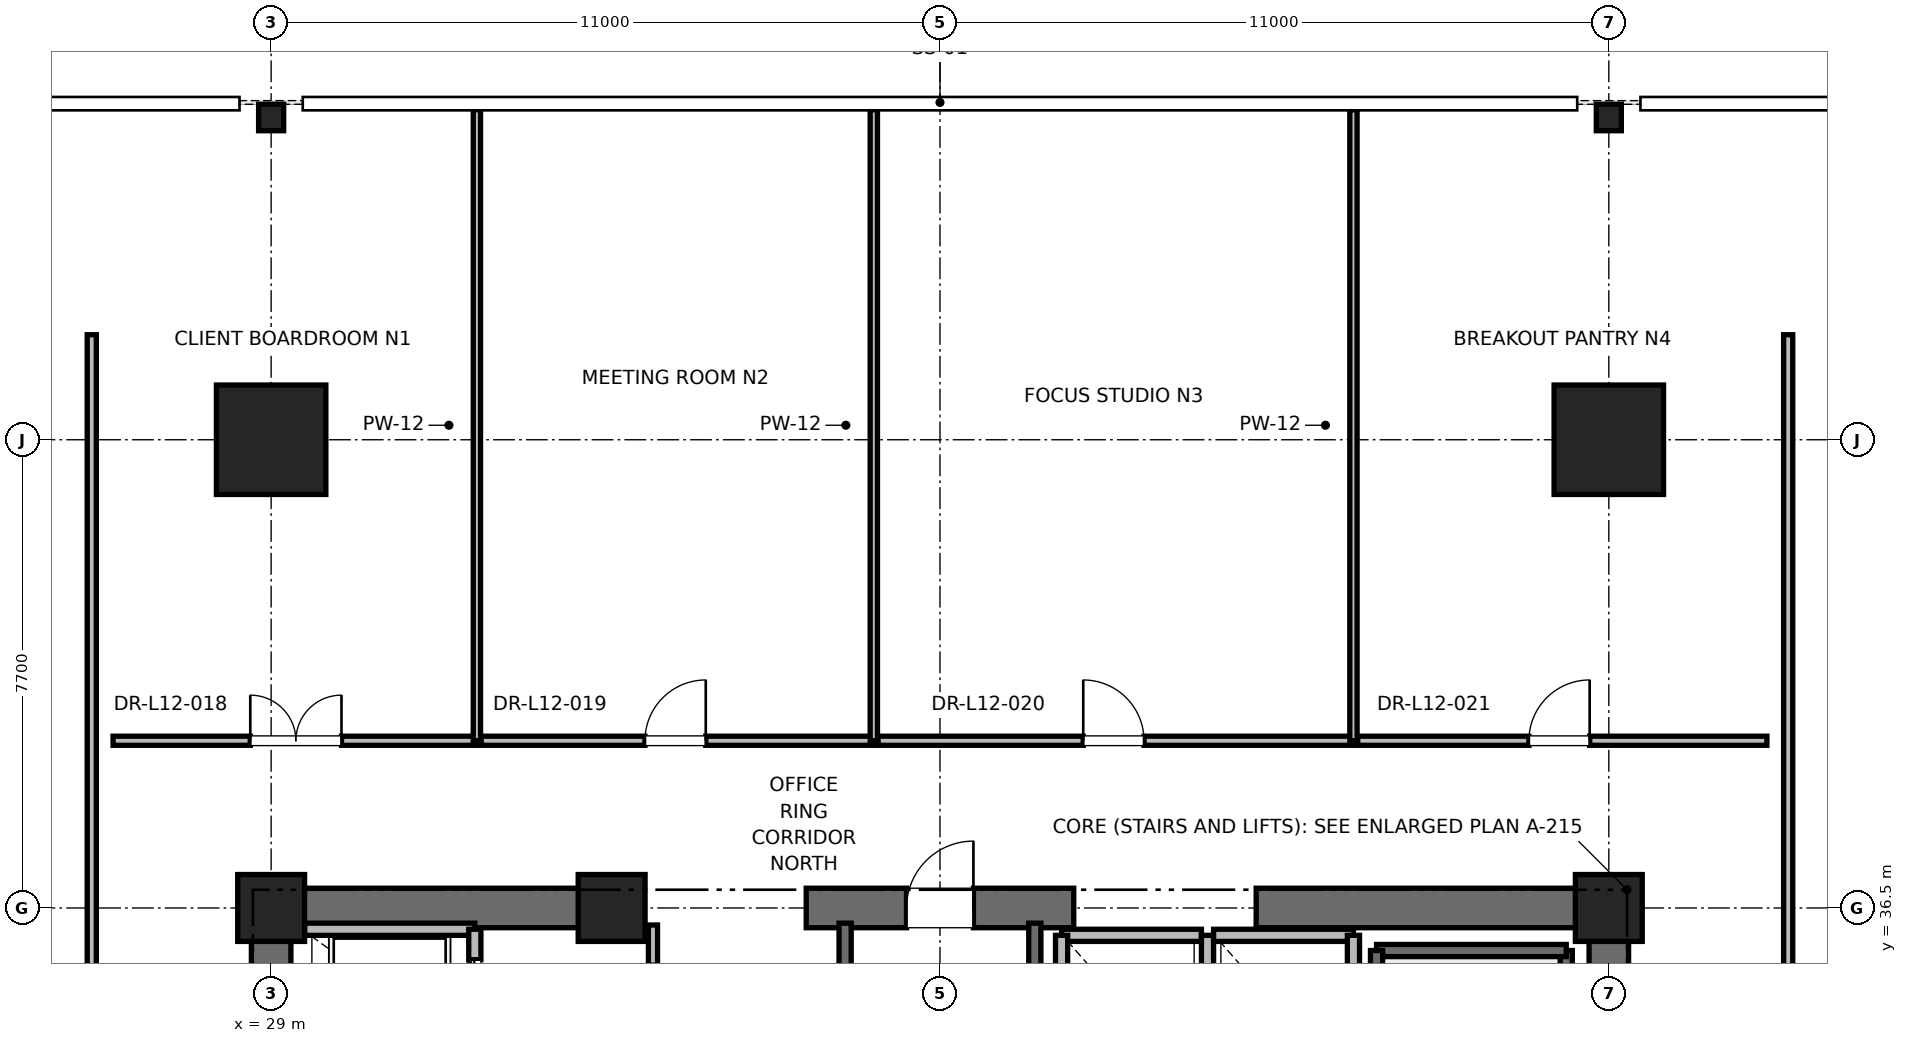
"""IFC4 building model, lengths in metres.
Left out: names, types, materials, properties, quantities, classifications, styles, units other than length and angle.
Written with IfcOpenShell. Run it as: python <this file> out.ifc"""

import sys

from ifc_helpers import new_model, si_unit, direction, frame, frame_2d, origin, origin_2d, place, context, subcontext, project, spatial, rectangle, i_section, extrude, element, fill, save


model = new_model("IFC4")
c1 = context("Model", 3, precision=1e-05, world=origin(), true_north=direction((0.0, 1.0)))
c2 = subcontext(c1, "Body", "Model", "MODEL_VIEW")
j1 = project(units=[si_unit("LENGTHUNIT", "METRE"), si_unit("PLANEANGLEUNIT", "RADIAN")], contexts=[c1])
p1 = place(None, origin())
s1 = spatial("IfcSite", under=j1, at=p1, CompositionType="ELEMENT")
p2 = place(p1, origin())
s2 = spatial("IfcBuilding", under=s1, at=p2, CompositionType="ELEMENT")
p3 = place(p2, frame((0.0, 0.0, 55.6)))
s3 = spatial("IfcBuildingStorey", under=s2, at=p3, CompositionType="ELEMENT", Elevation=55.6)
for number, where, z_axis, x_axis in (
    (1, (29.0, 44.2, 0.0), (0.0, 0.0, 1.0), (1.0, 0.0, 0.0)),
    (2, (51.0, 44.2, 0.0), (0.0, 0.0, 1.0), (1.0, 0.0, 0.0)),
):
    element("IfcColumn", number, at=place(p3, frame(where, z_axis=z_axis, x_axis=x_axis)), inside=s3, PredefinedType="COLUMN", context=c2, shape_type="SweptSolid", body=[
        extrude(rectangle(XDim=1.8, YDim=1.8, at=origin_2d()), origin(), (0.0, 0.0, 1.0), 4.0),
    ])
for number, where, z_axis, x_axis in (
    (3, (29.0, 49.5, 0.0), (0.0, 0.0, 1.0), (1.0, 0.0, 0.0)),
    (4, (51.0, 49.5, 0.0), (0.0, 0.0, 1.0), (1.0, 0.0, 0.0)),
):
    element("IfcColumn", number, at=place(p3, frame(where, z_axis=z_axis, x_axis=x_axis)), inside=s3, PredefinedType="COLUMN", context=c2, shape_type="SweptSolid", body=[
        extrude(i_section(OverallWidth=0.412, OverallDepth=0.437, WebThickness=0.036, FlangeThickness=0.058, FilletRadius=0.015, at=origin_2d()), origin(), (0.0, 0.0, 1.0), 4.0),
    ])
for number, where, z_axis, x_axis in (
    (5, (29.0, 36.5, 0.0), (0.0, 0.0, 1.0), (1.0, 0.0, 0.0)),
    (6, (51.0, 36.5, 0.0), (0.0, 0.0, 1.0), (1.0, 0.0, 0.0)),
    (7, (34.6, 36.5, 0.0), (0.0, 0.0, 1.0), (1.0, 0.0, 0.0)),
):
    element("IfcColumn", number, at=place(p3, frame(where, z_axis=z_axis, x_axis=x_axis)), inside=s3, PredefinedType="PILASTER", context=c2, shape_type="SweptSolid", body=[
        extrude(rectangle(XDim=1.1, YDim=1.1, at=origin_2d()), origin(), (0.0, 0.0, 1.0), 4.0),
    ])
p4 = place(p3, frame((29.0, 36.5, 0.0), z_axis=(0.0, 0.0, 1.0), x_axis=(1.0, 0.0, 0.0)))
e8 = element("IfcWall", 8, at=p4, inside=s3, PredefinedType="SHEAR", context=c2, shape_type="SweptSolid", body=[
    extrude(rectangle(XDim=5.8, YDim=0.65, at=frame_2d((2.9, 0.0))), origin(), (0.0, 0.0, 1.0), 3.76),
])
p5 = place(p3, frame((37.8, 36.5, 0.0), z_axis=(0.0, 0.0, 1.0), x_axis=(1.0, 0.0, 0.0)))
e9 = element("IfcWall", 9, at=p5, inside=s3, PredefinedType="SHEAR", context=c2, shape_type="SweptSolid", body=[
    extrude(rectangle(XDim=4.4, YDim=0.65, at=frame_2d((2.2, 0.0))), origin(), (0.0, 0.0, 1.0), 3.76),
])
p6 = place(p5, frame((1.65, 0.0, 0.0)))
e10 = element("IfcOpeningElement", 10, at=p6, cuts=e9, PredefinedType="OPENING", context=c2, shape_type="SweptSolid", body=[
    extrude(rectangle(XDim=1.1, YDim=2.15, at=frame_2d((0.55, 1.075))), frame((0.0, 0.325, 0.0), z_axis=(0.0, -1.0, 0.0), x_axis=(1.0, 0.0, 0.0)), (0.0, 0.0, 1.0), 0.65),
])
for number, where, z_axis, x_axis in (
    (11, (45.2, 36.5, 0.0), (0.0, 0.0, 1.0), (1.0, 0.0, 0.0)),
    (12, (29.0, 30.7, 0.0), (0.0, 0.0, 1.0), (0.0, 1.0, 0.0)),
):
    element("IfcWall", number, at=place(p3, frame(where, z_axis=z_axis, x_axis=x_axis)), inside=s3, PredefinedType="SHEAR", context=c2, shape_type="SweptSolid", body=[
        extrude(rectangle(XDim=5.8, YDim=0.65, at=frame_2d((2.9, 0.0))), origin(), (0.0, 0.0, 1.0), 3.76),
    ])
p7 = place(p3, frame((51.0, 27.7, 0.0), z_axis=(0.0, 0.0, 1.0), x_axis=(0.0, 1.0, 0.0)))
e13 = element("IfcWall", 13, at=p7, inside=s3, PredefinedType="SHEAR", context=c2, shape_type="SweptSolid", body=[
    extrude(rectangle(XDim=8.8, YDim=0.65, at=frame_2d((4.4, 0.0))), origin(), (0.0, 0.0, 1.0), 3.76),
])
p8 = place(p3, frame((50.3, 27.65, 0.0), z_axis=(0.0, 0.0, 1.0), x_axis=(0.0, 1.0, 0.0)))
e14 = element("IfcWall", 14, at=p8, inside=s3, PredefinedType="SOLIDWALL", context=c2, shape_type="SweptSolid", body=[
    extrude(rectangle(XDim=8.15, YDim=0.2, at=frame_2d((4.075, 0.0))), origin(), (0.0, 0.0, 1.0), 3.76),
])
p9 = place(p3, frame((47.18, 35.8, 0.0), z_axis=(0.0, 0.0, 1.0), x_axis=(1.0, 0.0, 0.0)))
e15 = element("IfcWall", 15, at=p9, inside=s3, PredefinedType="SOLIDWALL", context=c2, shape_type="SweptSolid", body=[
    extrude(rectangle(XDim=3.12, YDim=0.2, at=frame_2d((1.56, 0.0))), origin(), (0.0, 0.0, 1.0), 3.76),
])
p10 = place(p3, frame((47.18, 27.62, 0.0), z_axis=(0.0, 0.0, 1.0), x_axis=(0.0, 1.0, 0.0)))
e16 = element("IfcWall", 16, at=p10, inside=s3, PredefinedType="SOLIDWALL", context=c2, shape_type="SweptSolid", body=[
    extrude(rectangle(XDim=8.18, YDim=0.2, at=frame_2d((4.09, 0.0))), origin(), (0.0, 0.0, 1.0), 3.76),
])
p11 = place(p3, frame((38.44, 27.38, 0.0), z_axis=(0.0, 0.0, 1.0), x_axis=(0.0, 1.0, 0.0)))
e17 = element("IfcWall", 17, at=p11, inside=s3, PredefinedType="SOLIDWALL", context=c2, shape_type="SweptSolid", body=[
    extrude(rectangle(XDim=8.87, YDim=0.2, at=frame_2d((4.435, 0.0))), origin(), (0.0, 0.0, 1.0), 3.76),
])
p12 = place(p3, frame((41.56, 27.68, 0.0), z_axis=(0.0, 0.0, 1.0), x_axis=(0.0, 1.0, 0.0)))
e18 = element("IfcWall", 18, at=p12, inside=s3, PredefinedType="SOLIDWALL", context=c2, shape_type="SweptSolid", body=[
    extrude(rectangle(XDim=8.57, YDim=0.2, at=frame_2d((4.285, 0.0))), origin(), (0.0, 0.0, 1.0), 3.76),
])
p13 = place(p3, frame((32.35, 36.15, 0.0), z_axis=(0.0, 0.0, 1.0), x_axis=(-1.0, 0.0, 0.0)))
e19 = element("IfcWall", 19, at=p13, inside=s3, PredefinedType="SOLIDWALL", context=c2, shape_type="SweptSolid", body=[
    extrude(rectangle(XDim=2.8, YDim=0.2, at=frame_2d((1.4, 0.0))), origin(), (0.0, 0.0, 1.0), 2.889),
])
p14 = place(p3, frame((32.35, 34.05, 0.0), z_axis=(0.0, 0.0, 1.0), x_axis=(0.0, 1.0, 0.0)))
e20 = element("IfcWall", 20, at=p14, inside=s3, PredefinedType="SOLIDWALL", context=c2, shape_type="SweptSolid", body=[
    extrude(rectangle(XDim=2.1, YDim=0.2, at=frame_2d((1.05, 0.0))), origin(), (0.0, 0.0, 1.0), 3.76),
])
p15 = place(p14, frame((0.5, 0.0, 0.0)))
e21 = element("IfcOpeningElement", 21, at=p15, cuts=e20, PredefinedType="OPENING", context=c2, shape_type="SweptSolid", body=[
    extrude(rectangle(XDim=1.1, YDim=2.2, at=frame_2d((0.55, 1.1))), frame((0.0, 0.1, 0.0), z_axis=(0.0, -1.0, 0.0), x_axis=(1.0, 0.0, 0.0)), (0.0, 0.0, 1.0), 0.2),
])
p16 = place(p3, frame((44.3, 36.05, 0.0), z_axis=(0.0, 0.0, 1.0), x_axis=(-1.0, 0.0, 0.0)))
e22 = element("IfcWall", 22, at=p16, inside=s3, PredefinedType="SOLIDWALL", context=c2, shape_type="SweptSolid", body=[
    extrude(rectangle(XDim=2.3, YDim=0.2, at=frame_2d((1.15, 0.0))), origin(), (0.0, 0.0, 1.0), 2.54),
])
for number, where, z_axis, x_axis in (
    (23, (42.0, 36.05, 0.0), (0.0, 0.0, 1.0), (0.0, -1.0, 0.0)),
    (24, (44.4, 33.45, 0.0), (0.0, 0.0, 1.0), (0.0, 1.0, 0.0)),
):
    element("IfcWall", number, at=place(p3, frame(where, z_axis=z_axis, x_axis=x_axis)), inside=s3, PredefinedType="SOLIDWALL", context=c2, shape_type="SweptSolid", body=[
        extrude(rectangle(XDim=2.6, YDim=0.2, at=frame_2d((1.3, 0.0))), origin(), (0.0, 0.0, 1.0), 2.54),
    ])
p17 = place(p3, frame((46.8, 36.05, 0.0), z_axis=(0.0, 0.0, 1.0), x_axis=(-1.0, 0.0, 0.0)))
e25 = element("IfcWall", 25, at=p17, inside=s3, PredefinedType="SOLIDWALL", context=c2, shape_type="SweptSolid", body=[
    extrude(rectangle(XDim=2.3, YDim=0.2, at=frame_2d((1.15, 0.0))), origin(), (0.0, 0.0, 1.0), 2.54),
])
p18 = place(p3, frame((46.8, 33.45, 0.0), z_axis=(0.0, 0.0, 1.0), x_axis=(0.0, 1.0, 0.0)))
e26 = element("IfcWall", 26, at=p18, inside=s3, PredefinedType="SOLIDWALL", context=c2, shape_type="SweptSolid", body=[
    extrude(rectangle(XDim=2.6, YDim=0.2, at=frame_2d((1.3, 0.0))), origin(), (0.0, 0.0, 1.0), 3.76),
])
p19 = place(p3, frame((35.28, 33.95, 0.0), z_axis=(0.0, 0.0, 1.0), x_axis=(0.0, 1.0, 0.0)))
e27 = element("IfcWall", 27, at=p19, inside=s3, PredefinedType="PARTITIONING", context=c2, shape_type="SweptSolid", body=[
    extrude(rectangle(XDim=2.27, YDim=0.15, at=frame_2d((1.135, 0.0))), origin(), (0.0, 0.0, 1.0), 2.54),
])
p20 = place(p19, frame((0.66, 0.0, 0.0)))
e28 = element("IfcOpeningElement", 28, at=p20, cuts=e27, PredefinedType="OPENING", context=c2, shape_type="SweptSolid", body=[
    extrude(rectangle(XDim=0.95, YDim=2.15, at=frame_2d((0.475, 1.075))), frame((0.0, 0.075, 0.0), z_axis=(0.0, -1.0, 0.0), x_axis=(1.0, 0.0, 0.0)), (0.0, 0.0, 1.0), 0.15),
])
p21 = place(p3, frame((26.4, 39.25, 0.0), z_axis=(0.0, 0.0, 1.0), x_axis=(1.0, 0.0, 0.0)))
e29 = element("IfcWall", 29, at=p21, inside=s3, PredefinedType="PARTITIONING", context=c2, shape_type="SweptSolid", body=[
    extrude(rectangle(XDim=5.984, YDim=0.15, at=frame_2d((2.992, 0.0))), origin(), (0.0, 0.0, 1.0), 2.85),
])
p22 = place(p21, frame((2.257, 0.0, 0.0)))
e30 = element("IfcOpeningElement", 30, at=p22, cuts=e29, PredefinedType="OPENING", context=c2, shape_type="SweptSolid", body=[
    extrude(rectangle(XDim=1.5, YDim=2.25, at=frame_2d((0.75, 1.125))), frame((0.0, 0.075, 0.0), z_axis=(0.0, -1.0, 0.0), x_axis=(1.0, 0.0, 0.0)), (0.0, 0.0, 1.0), 0.15),
])
p23 = place(p3, frame((32.384, 39.25, 0.0), z_axis=(0.0, 0.0, 1.0), x_axis=(0.0, 1.0, 0.0)))
e31 = element("IfcWall", 31, at=p23, inside=s3, PredefinedType="PARTITIONING", context=c2, shape_type="SweptSolid", body=[
    extrude(rectangle(XDim=10.377, YDim=0.12, at=frame_2d((5.188, 0.0))), origin(), (0.0, 0.0, 1.0), 2.39),
])
p24 = place(p3, frame((32.454, 39.25, 0.0), z_axis=(0.0, 0.0, 1.0), x_axis=(1.0, 0.0, 0.0)))
e32 = element("IfcWall", 32, at=p24, inside=s3, PredefinedType="PARTITIONING", context=c2, shape_type="SweptSolid", body=[
    extrude(rectangle(XDim=6.458, YDim=0.15, at=frame_2d((3.229, 0.0))), origin(), (0.0, 0.0, 1.0), 2.85),
])
p25 = place(p24, frame((2.694, 0.0, 0.0)))
e33 = element("IfcOpeningElement", 33, at=p25, cuts=e32, PredefinedType="OPENING", context=c2, shape_type="SweptSolid", body=[
    extrude(rectangle(XDim=1.0, YDim=2.15, at=frame_2d((0.5, 1.075))), frame((0.0, 0.075, 0.0), z_axis=(0.0, -1.0, 0.0), x_axis=(1.0, 0.0, 0.0)), (0.0, 0.0, 1.0), 0.15),
])
p26 = place(p3, frame((38.912, 39.25, 0.0), z_axis=(0.0, 0.0, 1.0), x_axis=(0.0, 1.0, 0.0)))
e34 = element("IfcWall", 34, at=p26, inside=s3, PredefinedType="PARTITIONING", context=c2, shape_type="SweptSolid", body=[
    extrude(rectangle(XDim=10.377, YDim=0.12, at=frame_2d((5.188, 0.0))), origin(), (0.0, 0.0, 1.0), 2.39),
])
p27 = place(p3, frame((38.982, 39.25, 0.0), z_axis=(0.0, 0.0, 1.0), x_axis=(1.0, 0.0, 0.0)))
e35 = element("IfcWall", 35, at=p27, inside=s3, PredefinedType="PARTITIONING", context=c2, shape_type="SweptSolid", body=[
    extrude(rectangle(XDim=7.818, YDim=0.15, at=frame_2d((3.909, 0.0))), origin(), (0.0, 0.0, 1.0), 2.85),
])
p28 = place(p27, frame((3.374, 0.0, 0.0)))
e36 = element("IfcOpeningElement", 36, at=p28, cuts=e35, PredefinedType="OPENING", context=c2, shape_type="SweptSolid", body=[
    extrude(rectangle(XDim=1.0, YDim=2.15, at=frame_2d((0.5, 1.075))), frame((0.0, 0.075, 0.0), z_axis=(0.0, -1.0, 0.0), x_axis=(1.0, 0.0, 0.0)), (0.0, 0.0, 1.0), 0.15),
])
p29 = place(p3, frame((46.8, 39.25, 0.0), z_axis=(0.0, 0.0, 1.0), x_axis=(0.0, 1.0, 0.0)))
e37 = element("IfcWall", 37, at=p29, inside=s3, PredefinedType="PARTITIONING", context=c2, shape_type="SweptSolid", body=[
    extrude(rectangle(XDim=10.377, YDim=0.12, at=frame_2d((5.188, 0.0))), origin(), (0.0, 0.0, 1.0), 2.39),
])
p30 = place(p3, frame((46.87, 39.25, 0.0), z_axis=(0.0, 0.0, 1.0), x_axis=(1.0, 0.0, 0.0)))
e38 = element("IfcWall", 38, at=p30, inside=s3, PredefinedType="PARTITIONING", context=c2, shape_type="SweptSolid", body=[
    extrude(rectangle(XDim=6.73, YDim=0.15, at=frame_2d((3.365, 0.0))), origin(), (0.0, 0.0, 1.0), 2.85),
])
p31 = place(p30, frame((2.815, 0.0, 0.0)))
e39 = element("IfcOpeningElement", 39, at=p31, cuts=e38, PredefinedType="OPENING", context=c2, shape_type="SweptSolid", body=[
    extrude(rectangle(XDim=1.0, YDim=2.15, at=frame_2d((0.5, 1.075))), frame((0.0, 0.075, 0.0), z_axis=(0.0, -1.0, 0.0), x_axis=(1.0, 0.0, 0.0)), (0.0, 0.0, 1.0), 0.15),
])
p32 = place(p3, frame((26.05, 30.518, 0.0), z_axis=(0.0, 0.0, 1.0), x_axis=(0.0, 1.0, 0.0)))
e40 = element("IfcWall", 40, at=p32, inside=s3, PredefinedType="PARTITIONING", context=c2, shape_type="SweptSolid", body=[
    extrude(rectangle(XDim=15.409, YDim=0.15, at=frame_2d((7.705, 0.0))), origin(), (0.0, 0.0, 1.0), 2.85),
])
p33 = place(p32, frame((2.416, 0.0, 0.0)))
e41 = element("IfcOpeningElement", 41, at=p33, cuts=e40, PredefinedType="OPENING", context=c2, shape_type="SweptSolid", body=[
    extrude(rectangle(XDim=1.05, YDim=2.2, at=frame_2d((0.525, 1.1))), frame((0.0, 0.075, 0.0), z_axis=(0.0, -1.0, 0.0), x_axis=(1.0, 0.0, 0.0)), (0.0, 0.0, 1.0), 0.15),
])
p34 = place(p3, frame((53.95, 31.992, 0.0), z_axis=(0.0, 0.0, 1.0), x_axis=(0.0, 1.0, 0.0)))
e42 = element("IfcWall", 42, at=p34, inside=s3, PredefinedType="PARTITIONING", context=c2, shape_type="SweptSolid", body=[
    extrude(rectangle(XDim=13.935, YDim=0.15, at=frame_2d((6.967, 0.0))), origin(), (0.0, 0.0, 1.0), 2.85),
])
p35 = place(p34, frame((1.704, 0.0, 0.0)))
e43 = element("IfcOpeningElement", 43, at=p35, cuts=e42, PredefinedType="OPENING", context=c2, shape_type="SweptSolid", body=[
    extrude(rectangle(XDim=1.0, YDim=2.15, at=frame_2d((0.5, 1.075))), frame((0.0, 0.075, 0.0), z_axis=(0.0, -1.0, 0.0), x_axis=(1.0, 0.0, 0.0)), (0.0, 0.0, 1.0), 0.15),
])
p36 = place(p6, origin())
e44 = element("IfcDoor", 44, at=p36, inside=s3, OperationType="SINGLE_SWING_RIGHT", PredefinedType="DOOR", context=c2, shape_type="SweptSolid", body=[
    extrude(rectangle(XDim=1.1, YDim=2.15, at=frame_2d((0.55, 1.075))), frame((0.0, 0.025, 0.0), z_axis=(0.0, -1.0, 0.0), x_axis=(1.0, 0.0, 0.0)), (0.0, 0.0, 1.0), 0.05),
])
fill(e10, e44)
p37 = place(p15, origin())
e45 = element("IfcDoor", 45, at=p37, inside=s3, OperationType="SLIDING_TO_RIGHT", PredefinedType="DOOR", context=c2, shape_type="SweptSolid", body=[
    extrude(rectangle(XDim=1.1, YDim=2.2, at=frame_2d((0.55, 1.1))), frame((0.0, 0.025, 0.0), z_axis=(0.0, -1.0, 0.0), x_axis=(1.0, 0.0, 0.0)), (0.0, 0.0, 1.0), 0.05),
])
fill(e21, e45)
p38 = place(p22, origin())
e46 = element("IfcDoor", 46, at=p38, inside=s3, OperationType="DOUBLE_DOOR_SINGLE_SWING", PredefinedType="DOOR", context=c2, shape_type="SweptSolid", body=[
    extrude(rectangle(XDim=1.5, YDim=2.25, at=frame_2d((0.75, 1.125))), frame((0.0, 0.025, 0.0), z_axis=(0.0, -1.0, 0.0), x_axis=(1.0, 0.0, 0.0)), (0.0, 0.0, 1.0), 0.05),
])
fill(e30, e46)
p39 = place(p25, origin())
e47 = element("IfcDoor", 47, at=p39, inside=s3, OperationType="SINGLE_SWING_RIGHT", PredefinedType="DOOR", context=c2, shape_type="SweptSolid", body=[
    extrude(rectangle(XDim=1.0, YDim=2.15, at=frame_2d((0.5, 1.075))), frame((0.0, 0.025, 0.0), z_axis=(0.0, -1.0, 0.0), x_axis=(1.0, 0.0, 0.0)), (0.0, 0.0, 1.0), 0.05),
])
fill(e33, e47)
p40 = place(p28, origin())
e48 = element("IfcDoor", 48, at=p40, inside=s3, OperationType="SINGLE_SWING_LEFT", PredefinedType="DOOR", context=c2, shape_type="SweptSolid", body=[
    extrude(rectangle(XDim=1.0, YDim=2.15, at=frame_2d((0.5, 1.075))), frame((0.0, 0.025, 0.0), z_axis=(0.0, -1.0, 0.0), x_axis=(1.0, 0.0, 0.0)), (0.0, 0.0, 1.0), 0.05),
])
fill(e36, e48)
p41 = place(p31, origin())
e49 = element("IfcDoor", 49, at=p41, inside=s3, OperationType="SINGLE_SWING_RIGHT", PredefinedType="DOOR", context=c2, shape_type="SweptSolid", body=[
    extrude(rectangle(XDim=1.0, YDim=2.15, at=frame_2d((0.5, 1.075))), frame((0.0, 0.025, 0.0), z_axis=(0.0, -1.0, 0.0), x_axis=(1.0, 0.0, 0.0)), (0.0, 0.0, 1.0), 0.05),
])
fill(e39, e49)
save(model, sys.argv[1])
